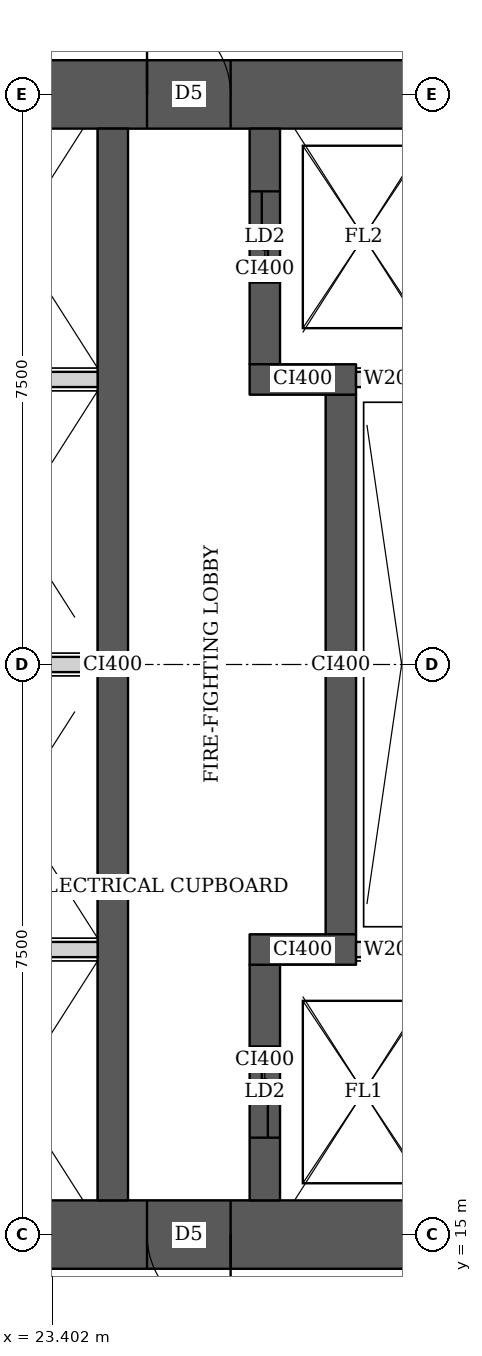
"""IFC4 building model, lengths in metres.
Left out: names, types, materials, properties, quantities, classifications, styles, units other than length and angle.
Written with IfcOpenShell. Run it as: python <this file> out.ifc"""

import sys

from ifc_helpers import new_model, si_unit, direction, frame, frame_2d, origin, place, context, subcontext, project, spatial, rectangle, extrude, element, fill, save


model = new_model("IFC4")
c1 = context("Model", 3, precision=1e-05, world=origin(), true_north=direction((0.0, 1.0)))
c2 = subcontext(c1, "Body", "Model", "MODEL_VIEW")
j1 = project(units=[si_unit("LENGTHUNIT", "METRE"), si_unit("PLANEANGLEUNIT", "RADIAN")], contexts=[c1])
p1 = place(None, origin())
s1 = spatial("IfcSite", under=j1, at=p1, CompositionType="ELEMENT")
p2 = place(p1, origin())
s2 = spatial("IfcBuilding", under=s1, at=p2, CompositionType="ELEMENT")
p3 = place(p2, frame((0.0, 0.0, 42.5)))
s3 = spatial("IfcBuildingStorey", under=s2, at=p3, CompositionType="ELEMENT", Elevation=42.5)
p4 = place(p3, frame((13.95, 15.0, 0.0), z_axis=(0.0, 0.0, 1.0), x_axis=(1.0, 0.0, 0.0)))
e1 = element("IfcWall", 1, at=p4, inside=s3, PredefinedType="SHEAR", context=c2, shape_type="SweptSolid", body=[
    extrude(rectangle(XDim=15.3, YDim=0.9, at=frame_2d((7.65, 0.0))), origin(), (0.0, 0.0, 1.0), 3.75),
])
p5 = place(p4, frame((4.45, 0.0, 0.0)))
e2 = element("IfcOpeningElement", 2, at=p5, cuts=e1, PredefinedType="OPENING", context=c2, shape_type="SweptSolid", body=[
    extrude(rectangle(XDim=1.8, YDim=2.1, at=frame_2d((0.9, 1.05))), frame((0.0, 0.46, 0.0), z_axis=(0.0, -1.0, 0.0), x_axis=(1.0, 0.0, 0.0)), (0.0, 0.0, 1.0), 0.92),
])
p6 = place(p4, frame((10.7, 0.0, 0.0)))
e3 = element("IfcOpeningElement", 3, at=p6, cuts=e1, PredefinedType="OPENING", context=c2, shape_type="SweptSolid", body=[
    extrude(rectangle(XDim=1.1, YDim=2.1, at=frame_2d((0.55, 1.05))), frame((0.0, 0.46, 0.0), z_axis=(0.0, -1.0, 0.0), x_axis=(1.0, 0.0, 0.0)), (0.0, 0.0, 1.0), 0.92),
])
p7 = place(p3, frame((13.95, 30.0, 0.0), z_axis=(0.0, 0.0, 1.0), x_axis=(1.0, 0.0, 0.0)))
e4 = element("IfcWall", 4, at=p7, inside=s3, PredefinedType="SHEAR", context=c2, shape_type="SweptSolid", body=[
    extrude(rectangle(XDim=15.3, YDim=0.9, at=frame_2d((7.65, 0.0))), origin(), (0.0, 0.0, 1.0), 3.75),
])
p8 = place(p7, frame((4.45, 0.0, 0.0)))
e5 = element("IfcOpeningElement", 5, at=p8, cuts=e4, PredefinedType="OPENING", context=c2, shape_type="SweptSolid", body=[
    extrude(rectangle(XDim=1.8, YDim=2.1, at=frame_2d((0.9, 1.05))), frame((0.0, 0.46, 0.0), z_axis=(0.0, -1.0, 0.0), x_axis=(1.0, 0.0, 0.0)), (0.0, 0.0, 1.0), 0.92),
])
p9 = place(p7, frame((10.7, 0.0, 0.0)))
e6 = element("IfcOpeningElement", 6, at=p9, cuts=e4, PredefinedType="OPENING", context=c2, shape_type="SweptSolid", body=[
    extrude(rectangle(XDim=1.1, YDim=2.1, at=frame_2d((0.55, 1.05))), frame((0.0, 0.46, 0.0), z_axis=(0.0, -1.0, 0.0), x_axis=(1.0, 0.0, 0.0)), (0.0, 0.0, 1.0), 0.92),
])
p10 = place(p3, frame((24.2, 15.45, 0.0), z_axis=(0.0, 0.0, 1.0), x_axis=(0.0, 1.0, 0.0)))
e7 = element("IfcWall", 7, at=p10, inside=s3, PredefinedType="SHEAR", context=c2, shape_type="SweptSolid", body=[
    extrude(rectangle(XDim=14.1, YDim=0.4, at=frame_2d((7.05, 0.0))), origin(), (0.0, 0.0, 1.0), 3.75),
])
p11 = place(p3, frame((26.2, 15.45, 0.0), z_axis=(0.0, 0.0, 1.0), x_axis=(0.0, 1.0, 0.0)))
e8 = element("IfcWall", 8, at=p11, inside=s3, PredefinedType="SHEAR", context=c2, shape_type="SweptSolid", body=[
    extrude(rectangle(XDim=3.1, YDim=0.4, at=frame_2d((1.55, 0.0))), origin(), (0.0, 0.0, 1.0), 3.75),
])
p12 = place(p11, frame((0.825, 0.0, 0.0)))
e9 = element("IfcOpeningElement", 9, at=p12, cuts=e8, PredefinedType="OPENING", context=c2, shape_type="SweptSolid", body=[
    extrude(rectangle(XDim=1.2, YDim=2.1, at=frame_2d((0.6, 1.05))), frame((0.0, 0.21, 0.0), z_axis=(0.0, -1.0, 0.0), x_axis=(1.0, 0.0, 0.0)), (0.0, 0.0, 1.0), 0.42),
])
p13 = place(p3, frame((26.0, 18.75, 0.0), z_axis=(0.0, 0.0, 1.0), x_axis=(1.0, 0.0, 0.0)))
e10 = element("IfcWall", 10, at=p13, inside=s3, PredefinedType="SHEAR", context=c2, shape_type="SweptSolid", body=[
    extrude(rectangle(XDim=1.4, YDim=0.4, at=frame_2d((0.7, 0.0))), origin(), (0.0, 0.0, 1.0), 3.75),
])
p14 = place(p3, frame((27.2, 18.95, 0.0), z_axis=(0.0, 0.0, 1.0), x_axis=(0.0, 1.0, 0.0)))
e11 = element("IfcWall", 11, at=p14, inside=s3, PredefinedType="SHEAR", context=c2, shape_type="SweptSolid", body=[
    extrude(rectangle(XDim=7.1, YDim=0.4, at=frame_2d((3.55, 0.0))), origin(), (0.0, 0.0, 1.0), 3.75),
])
p15 = place(p3, frame((26.0, 26.25, 0.0), z_axis=(0.0, 0.0, 1.0), x_axis=(1.0, 0.0, 0.0)))
e12 = element("IfcWall", 12, at=p15, inside=s3, PredefinedType="SHEAR", context=c2, shape_type="SweptSolid", body=[
    extrude(rectangle(XDim=1.4, YDim=0.4, at=frame_2d((0.7, 0.0))), origin(), (0.0, 0.0, 1.0), 3.75),
])
p16 = place(p3, frame((26.2, 26.45, 0.0), z_axis=(0.0, 0.0, 1.0), x_axis=(0.0, 1.0, 0.0)))
e13 = element("IfcWall", 13, at=p16, inside=s3, PredefinedType="SHEAR", context=c2, shape_type="SweptSolid", body=[
    extrude(rectangle(XDim=3.1, YDim=0.4, at=frame_2d((1.55, 0.0))), origin(), (0.0, 0.0, 1.0), 3.75),
])
p17 = place(p16, frame((1.075, 0.0, 0.0)))
e14 = element("IfcOpeningElement", 14, at=p17, cuts=e13, PredefinedType="OPENING", context=c2, shape_type="SweptSolid", body=[
    extrude(rectangle(XDim=1.2, YDim=2.1, at=frame_2d((0.6, 1.05))), frame((0.0, 0.21, 0.0), z_axis=(0.0, -1.0, 0.0), x_axis=(1.0, 0.0, 0.0)), (0.0, 0.0, 1.0), 0.42),
])
for number, where, z_axis, x_axis in (
    (15, (21.8, 18.75, 0.0), (0.0, 0.0, 1.0), (1.0, 0.0, 0.0)),
    (16, (21.8, 22.5, 0.0), (0.0, 0.0, 1.0), (1.0, 0.0, 0.0)),
    (17, (21.8, 26.25, 0.0), (0.0, 0.0, 1.0), (1.0, 0.0, 0.0)),
):
    element("IfcWall", number, at=place(p3, frame(where, z_axis=z_axis, x_axis=x_axis)), inside=s3, PredefinedType="SOLIDWALL", context=c2, shape_type="SweptSolid", body=[
        extrude(rectangle(XDim=2.2, YDim=0.2, at=frame_2d((1.1, 0.0))), origin(), (0.0, 0.0, 1.0), 3.5),
    ])
for number, where, z_axis, x_axis in (
    (18, (27.4, 18.75, 0.0), (0.0, 0.0, 1.0), (1.0, 0.0, 0.0)),
    (19, (27.4, 26.25, 0.0), (0.0, 0.0, 1.0), (1.0, 0.0, 0.0)),
):
    element("IfcWall", number, at=place(p3, frame(where, z_axis=z_axis, x_axis=x_axis)), inside=s3, PredefinedType="SOLIDWALL", context=c2, shape_type="SweptSolid", body=[
        extrude(rectangle(XDim=0.95, YDim=0.2, at=frame_2d((0.475, 0.0))), origin(), (0.0, 0.0, 1.0), 3.5),
    ])
p18 = place(p6, origin())
e20 = element("IfcDoor", 20, at=p18, inside=s3, OperationType="SINGLE_SWING_LEFT", PredefinedType="DOOR", context=c2, shape_type="SweptSolid", body=[
    extrude(rectangle(XDim=1.1, YDim=2.1, at=frame_2d((0.55, 1.05))), frame((0.0, 0.025, 0.0), z_axis=(0.0, -1.0, 0.0), x_axis=(1.0, 0.0, 0.0)), (0.0, 0.0, 1.0), 0.05),
])
fill(e3, e20)
p19 = place(p9, origin())
e21 = element("IfcDoor", 21, at=p19, inside=s3, OperationType="SINGLE_SWING_LEFT", PredefinedType="DOOR", context=c2, shape_type="SweptSolid", body=[
    extrude(rectangle(XDim=1.1, YDim=2.1, at=frame_2d((0.55, 1.05))), frame((0.0, 0.025, 0.0), z_axis=(0.0, -1.0, 0.0), x_axis=(1.0, 0.0, 0.0)), (0.0, 0.0, 1.0), 0.05),
])
fill(e6, e21)
p20 = place(p12, origin())
e22 = element("IfcDoor", 22, at=p20, inside=s3, OperationType="DOUBLE_DOOR_SLIDING", PredefinedType="DOOR", context=c2, shape_type="SweptSolid", body=[
    extrude(rectangle(XDim=1.2, YDim=2.1, at=frame_2d((0.6, 1.05))), frame((0.0, 0.025, 0.0), z_axis=(0.0, -1.0, 0.0), x_axis=(1.0, 0.0, 0.0)), (0.0, 0.0, 1.0), 0.05),
])
fill(e9, e22)
p21 = place(p17, origin())
e23 = element("IfcDoor", 23, at=p21, inside=s3, OperationType="DOUBLE_DOOR_SLIDING", PredefinedType="DOOR", context=c2, shape_type="SweptSolid", body=[
    extrude(rectangle(XDim=1.2, YDim=2.1, at=frame_2d((0.6, 1.05))), frame((0.0, 0.025, 0.0), z_axis=(0.0, -1.0, 0.0), x_axis=(1.0, 0.0, 0.0)), (0.0, 0.0, 1.0), 0.05),
])
fill(e14, e23)
save(model, sys.argv[1])
